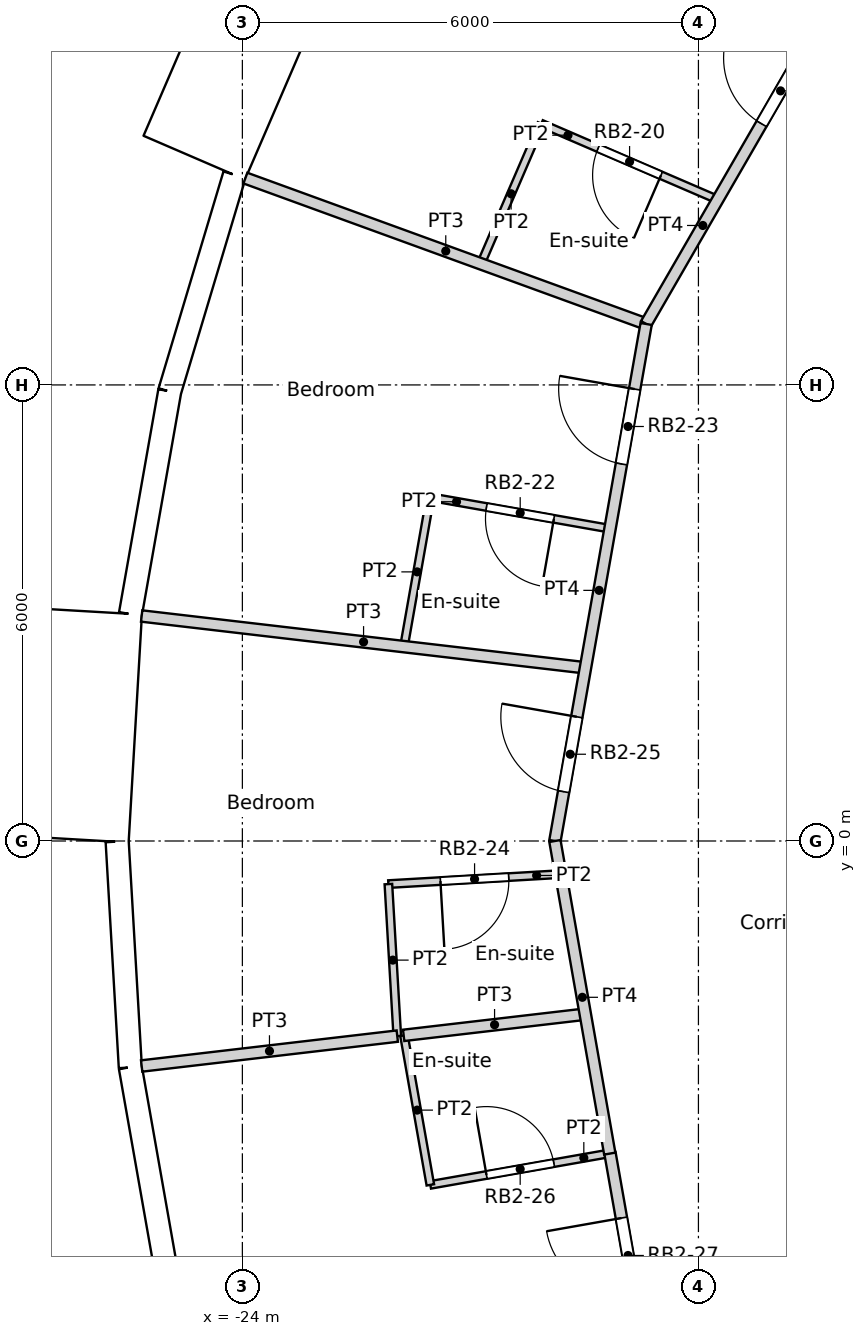
"""IFC4 building model, lengths in metres.
Left out: names, types, materials, properties, quantities, classifications, styles, units other than length and angle.
Written with IfcOpenShell. Run it as: python <this file> out.ifc"""

import sys

from ifc_helpers import new_model, si_unit, direction, frame, frame_2d, origin, origin_2d, place, context, subcontext, project, spatial, rectangle, circle, extrude, element, fill, save


model = new_model("IFC4")
c1 = context("Model", 3, precision=1e-05, world=origin(), true_north=direction((0.0, 1.0)))
c2 = subcontext(c1, "Body", "Model", "MODEL_VIEW")
j1 = project(units=[si_unit("LENGTHUNIT", "METRE"), si_unit("PLANEANGLEUNIT", "RADIAN")], contexts=[c1])
p1 = place(None, origin())
s1 = spatial("IfcSite", under=j1, at=p1, CompositionType="ELEMENT")
p2 = place(p1, origin())
s2 = spatial("IfcBuilding", under=s1, at=p2, CompositionType="ELEMENT")
p3 = place(p2, frame((0.0, 0.0, 136.8)))
s3 = spatial("IfcBuildingStorey", under=s2, at=p3, CompositionType="ELEMENT", Elevation=136.8)
for number, where, z_axis, x_axis in (
    (1, (-23.067, 8.396, 0.0), (0.0, 0.0, 1.0), (1.0, 0.0, 0.0)),
    (2, (-24.382, 2.85, 0.0), (0.0, 0.0, 1.0), (1.0, 0.0, 0.0)),
    (3, (-24.382, -2.85, 0.0), (0.0, 0.0, 1.0), (1.0, 0.0, 0.0)),
):
    element("IfcColumn", number, at=place(p3, frame(where, z_axis=z_axis, x_axis=x_axis)), inside=s3, PredefinedType="COLUMN", context=c2, shape_type="SweptSolid", body=[
        extrude(circle(Radius=0.6, at=origin_2d()), origin(), (0.0, 0.0, 1.0), 3.6),
    ])
for number, where, z_axis, x_axis in (
    (4, (-16.958, 8.167, 0.0), (0.0, 0.0, 1.0), (1.0, 0.0, 0.0)),
    (5, (-18.612, 2.805, 0.0), (0.0, 0.0, 1.0), (1.0, 0.0, 0.0)),
    (6, (-18.612, -2.805, 0.0), (0.0, 0.0, 1.0), (1.0, 0.0, 0.0)),
):
    element("IfcColumn", number, at=place(p3, frame(where, z_axis=z_axis, x_axis=x_axis)), inside=s3, PredefinedType="COLUMN", context=c2, shape_type="SweptSolid", body=[
        extrude(circle(Radius=0.65, at=origin_2d()), origin(), (0.0, 0.0, 1.0), 3.6),
    ])
p4 = place(p3, frame((-23.444, 11.746, -0.3), z_axis=(0.0, 0.0, 1.0), x_axis=(-0.396079003245, -0.918216435917, 0.0)))
e7 = element("IfcWall", 7, at=p4, inside=s3, PredefinedType="ELEMENTEDWALL", context=c2, shape_type="SweptSolid", body=[
    extrude(rectangle(XDim=3.0, YDim=1.45, at=frame_2d((1.5, 0.0))), origin(), (0.0, 0.0, 1.0), 3.6),
])
p5 = place(p4, frame((1.5, 0.0, 1.85)))
e8 = element("IfcOpeningElement", 8, at=p5, cuts=e7, PredefinedType="OPENING", context=c2, shape_type="SweptSolid", body=[
    extrude(circle(Radius=0.9, at=origin_2d()), frame((0.0, 0.735, 0.0), z_axis=(0.0, -1.0, 0.0), x_axis=(1.0, 0.0, 0.0)), (0.0, 0.0, 1.0), 1.47),
])
p6 = place(p3, frame((-24.104, 8.763, 0.0), z_axis=(0.0, 0.0, 1.0), x_axis=(-0.286782750849, -0.957995643944, 0.0)))
e9 = element("IfcWall", 9, at=p6, inside=s3, PredefinedType="SOLIDWALL", context=c2, shape_type="SweptSolid", body=[
    extrude(rectangle(XDim=2.973, YDim=0.3, at=frame_2d((1.486, 0.0))), origin(), (0.0, 0.0, 1.0), 2.8),
])
p7 = place(p6, frame((1.486, 0.0, 1.55)))
e10 = element("IfcOpeningElement", 10, at=p7, cuts=e9, PredefinedType="OPENING", context=c2, shape_type="SweptSolid", body=[
    extrude(circle(Radius=0.9, at=origin_2d()), frame((0.0, 0.16, 0.0), z_axis=(0.0, -1.0, 0.0), x_axis=(1.0, 0.0, 0.0)), (0.0, 0.0, 1.0), 0.32),
])
p8 = place(p3, frame((-24.956, 5.915, 0.0), z_axis=(0.0, 0.0, 1.0), x_axis=(-0.173686952598, -0.984800915159, 0.0)))
e11 = element("IfcWall", 11, at=p8, inside=s3, PredefinedType="SOLIDWALL", context=c2, shape_type="SweptSolid", body=[
    extrude(rectangle(XDim=2.973, YDim=0.3, at=frame_2d((1.486, 0.0))), origin(), (0.0, 0.0, 1.0), 3.3),
])
p9 = place(p8, frame((1.486, 0.0, 1.55)))
e12 = element("IfcOpeningElement", 12, at=p9, cuts=e11, PredefinedType="OPENING", context=c2, shape_type="SweptSolid", body=[
    extrude(circle(Radius=0.9, at=origin_2d()), frame((0.0, 0.16, 0.0), z_axis=(0.0, -1.0, 0.0), x_axis=(1.0, 0.0, 0.0)), (0.0, 0.0, 1.0), 0.32),
])
p10 = place(p3, frame((-26.048, 3.02, -0.3), z_axis=(0.0, 0.0, 1.0), x_axis=(-0.058106596105, -0.998310384344, 0.0)))
e13 = element("IfcWall", 13, at=p10, inside=s3, PredefinedType="ELEMENTEDWALL", context=c2, shape_type="SweptSolid", body=[
    extrude(rectangle(XDim=3.0, YDim=1.45, at=frame_2d((1.5, 0.0))), origin(), (0.0, 0.0, 1.0), 3.6),
])
p11 = place(p10, frame((1.5, 0.0, 1.85)))
e14 = element("IfcOpeningElement", 14, at=p11, cuts=e13, PredefinedType="OPENING", context=c2, shape_type="SweptSolid", body=[
    extrude(circle(Radius=0.9, at=origin_2d()), frame((0.0, 0.735, 0.0), z_axis=(0.0, -1.0, 0.0), x_axis=(1.0, 0.0, 0.0)), (0.0, 0.0, 1.0), 1.47),
])
p12 = place(p3, frame((-25.647, -0.01, 0.0), z_axis=(0.0, 0.0, 1.0), x_axis=(0.058139540521, -0.998308466271, 0.0)))
e15 = element("IfcWall", 15, at=p12, inside=s3, PredefinedType="SOLIDWALL", context=c2, shape_type="SweptSolid", body=[
    extrude(rectangle(XDim=2.973, YDim=0.3, at=frame_2d((1.487, 0.0))), origin(), (0.0, 0.0, 1.0), 2.8),
])
p13 = place(p12, frame((1.486, 0.0, 1.55)))
e16 = element("IfcOpeningElement", 16, at=p13, cuts=e15, PredefinedType="OPENING", context=c2, shape_type="SweptSolid", body=[
    extrude(circle(Radius=0.9, at=origin_2d()), frame((0.0, 0.16, 0.0), z_axis=(0.0, -1.0, 0.0), x_axis=(1.0, 0.0, 0.0)), (0.0, 0.0, 1.0), 0.32),
])
p14 = place(p3, frame((-25.474, -2.978, 0.0), z_axis=(0.0, 0.0, 1.0), x_axis=(0.173686952598, -0.984800915159, 0.0)))
e17 = element("IfcWall", 17, at=p14, inside=s3, PredefinedType="SOLIDWALL", context=c2, shape_type="SweptSolid", body=[
    extrude(rectangle(XDim=2.973, YDim=0.3, at=frame_2d((1.486, 0.0))), origin(), (0.0, 0.0, 1.0), 3.3),
])
p15 = place(p14, frame((1.486, 0.0, 1.55)))
e18 = element("IfcOpeningElement", 18, at=p15, cuts=e17, PredefinedType="OPENING", context=c2, shape_type="SweptSolid", body=[
    extrude(circle(Radius=0.9, at=origin_2d()), frame((0.0, 0.16, 0.0), z_axis=(0.0, -1.0, 0.0), x_axis=(1.0, 0.0, 0.0)), (0.0, 0.0, 1.0), 0.32),
])
p16 = place(p3, frame((-18.69, 6.803, 0.0), z_axis=(0.0, 0.0, 1.0), x_axis=(0.500229307554, 0.865892972523, 0.0)))
e19 = element("IfcWall", 19, at=p16, inside=s3, PredefinedType="PARTITIONING", context=c2, shape_type="SweptSolid", body=[
    extrude(rectangle(XDim=6.907, YDim=0.15, at=frame_2d((3.454, 0.0))), origin(), (0.0, 0.0, 1.0), 3.3),
])
p17 = place(p16, frame((3.04, 0.0, 0.0)))
e20 = element("IfcOpeningElement", 20, at=p17, cuts=e19, PredefinedType="OPENING", context=c2, shape_type="SweptSolid", body=[
    extrude(rectangle(XDim=1.0, YDim=2.1, at=frame_2d((0.5, 1.05))), frame((0.0, 0.075, 0.0), z_axis=(0.0, -1.0, 0.0), x_axis=(1.0, 0.0, 0.0)), (0.0, 0.0, 1.0), 0.15),
])
p18 = place(p3, frame((-19.888, 0.0, 0.0), z_axis=(0.0, 0.0, 1.0), x_axis=(0.173763153374, 0.984787472772, 0.0)))
e21 = element("IfcWall", 21, at=p18, inside=s3, PredefinedType="PARTITIONING", context=c2, shape_type="SweptSolid", body=[
    extrude(rectangle(XDim=6.907, YDim=0.15, at=frame_2d((3.454, 0.0))), origin(), (0.0, 0.0, 1.0), 3.3),
])
p19 = place(p18, frame((5.037, 0.0, 0.0)))
e22 = element("IfcOpeningElement", 22, at=p19, cuts=e21, PredefinedType="OPENING", context=c2, shape_type="SweptSolid", body=[
    extrude(rectangle(XDim=1.0, YDim=2.1, at=frame_2d((0.5, 1.05))), frame((0.0, 0.075, 0.0), z_axis=(0.0, -1.0, 0.0), x_axis=(1.0, 0.0, 0.0)), (0.0, 0.0, 1.0), 0.15),
])
p20 = place(p18, frame((0.659, 0.0, 0.0)))
e23 = element("IfcOpeningElement", 23, at=p20, cuts=e21, PredefinedType="OPENING", context=c2, shape_type="SweptSolid", body=[
    extrude(rectangle(XDim=1.0, YDim=2.1, at=frame_2d((0.5, 1.05))), frame((0.0, 0.075, 0.0), z_axis=(0.0, -1.0, 0.0), x_axis=(1.0, 0.0, 0.0)), (0.0, 0.0, 1.0), 0.15),
])
p21 = place(p3, frame((-19.888, 0.0, 0.0), z_axis=(0.0, 0.0, 1.0), x_axis=(0.1727845501, -0.984959643461, 0.0)))
e24 = element("IfcWall", 24, at=p21, inside=s3, PredefinedType="PARTITIONING", context=c2, shape_type="SweptSolid", body=[
    extrude(rectangle(XDim=4.175, YDim=0.15, at=frame_2d((2.088, 0.0))), origin(), (0.0, 0.0, 1.0), 3.3),
])
p22 = place(p3, frame((-19.164, -4.104, 0.0), z_axis=(0.0, 0.0, 1.0), x_axis=(0.173770083029, -0.984786250028, 0.0)))
e25 = element("IfcWall", 25, at=p22, inside=s3, PredefinedType="PARTITIONING", context=c2, shape_type="SweptSolid", body=[
    extrude(rectangle(XDim=2.74, YDim=0.15, at=frame_2d((1.37, 0.0))), origin(), (0.0, 0.0, 1.0), 3.3),
])
p23 = place(p22, frame((0.87, 0.0, 0.0)))
e26 = element("IfcOpeningElement", 26, at=p23, cuts=e25, PredefinedType="OPENING", context=c2, shape_type="SweptSolid", body=[
    extrude(rectangle(XDim=1.0, YDim=2.1, at=frame_2d((0.5, 1.05))), frame((0.0, 0.075, 0.0), z_axis=(0.0, -1.0, 0.0), x_axis=(1.0, 0.0, 0.0)), (0.0, 0.0, 1.0), 0.15),
])
p24 = place(p3, frame((-20.067, 9.437, 0.0), z_axis=(0.0, 0.0, 1.0), x_axis=(0.918293825202, -0.395899546091, 0.0)))
e27 = element("IfcWall", 27, at=p24, inside=s3, PredefinedType="PARTITIONING", context=c2, shape_type="SweptSolid", body=[
    extrude(rectangle(XDim=2.528, YDim=0.1, at=frame_2d((1.264, 0.0))), origin(), (0.0, 0.0, 1.0), 3.3),
])
p25 = place(p24, frame((0.815, 0.0, 0.0)))
e28 = element("IfcOpeningElement", 28, at=p25, cuts=e27, PredefinedType="OPENING", context=c2, shape_type="SweptSolid", body=[
    extrude(rectangle(XDim=0.9, YDim=2.04, at=frame_2d((0.45, 1.02))), frame((0.0, 0.05, 0.0), z_axis=(0.0, -1.0, 0.0), x_axis=(1.0, 0.0, 0.0)), (0.0, 0.0, 1.0), 0.1),
])
p26 = place(p3, frame((-20.862, 7.593, 0.0), z_axis=(0.0, 0.0, 1.0), x_axis=(0.395972527348, 0.918262357709, 0.0)))
e29 = element("IfcWall", 29, at=p26, inside=s3, PredefinedType="PARTITIONING", context=c2, shape_type="SweptSolid", body=[
    extrude(rectangle(XDim=2.008, YDim=0.1, at=frame_2d((1.004, 0.0))), origin(), (0.0, 0.0, 1.0), 3.3),
])
p27 = place(p3, frame((-23.96, 8.721, 0.0), z_axis=(0.0, 0.0, 1.0), x_axis=(0.939653583607, -0.342127378054, 0.0)))
e30 = element("IfcWall", 30, at=p27, inside=s3, PredefinedType="PARTITIONING", context=c2, shape_type="SweptSolid", body=[
    extrude(rectangle(XDim=5.61, YDim=0.15, at=frame_2d((2.805, 0.0))), origin(), (0.0, 0.0, 1.0), 3.3),
])
p28 = place(p3, frame((-21.527, 4.524, 0.0), z_axis=(0.0, 0.0, 1.0), x_axis=(0.9848663854, -0.173315327969, 0.0)))
e31 = element("IfcWall", 31, at=p28, inside=s3, PredefinedType="PARTITIONING", context=c2, shape_type="SweptSolid", body=[
    extrude(rectangle(XDim=2.4, YDim=0.1, at=frame_2d((1.2, 0.0))), origin(), (0.0, 0.0, 1.0), 3.3),
])
p29 = place(p28, frame((0.75, 0.0, 0.0)))
e32 = element("IfcOpeningElement", 32, at=p29, cuts=e31, PredefinedType="OPENING", context=c2, shape_type="SweptSolid", body=[
    extrude(rectangle(XDim=0.9, YDim=2.04, at=frame_2d((0.45, 1.02))), frame((0.0, 0.05, 0.0), z_axis=(0.0, -1.0, 0.0), x_axis=(1.0, 0.0, 0.0)), (0.0, 0.0, 1.0), 0.1),
])
p30 = place(p3, frame((-21.874, 2.557, 0.0), z_axis=(0.0, 0.0, 1.0), x_axis=(0.17368771375, 0.984800780916, 0.0)))
e33 = element("IfcWall", 33, at=p30, inside=s3, PredefinedType="PARTITIONING", context=c2, shape_type="SweptSolid", body=[
    extrude(rectangle(XDim=1.997, YDim=0.1, at=frame_2d((0.999, 0.0))), origin(), (0.0, 0.0, 1.0), 3.3),
])
p31 = place(p3, frame((-25.325, 2.96, 0.0), z_axis=(0.0, 0.0, 1.0), x_axis=(0.993249747924, -0.115995423397, 0.0)))
e34 = element("IfcWall", 34, at=p31, inside=s3, PredefinedType="PARTITIONING", context=c2, shape_type="SweptSolid", body=[
    extrude(rectangle(XDim=5.879, YDim=0.15, at=frame_2d((2.939, 0.0))), origin(), (0.0, 0.0, 1.0), 3.3),
])
p32 = place(p3, frame((-22.079, -0.567, 0.0), z_axis=(0.0, 0.0, 1.0), x_axis=(0.998314893836, 0.058029068102, 0.0)))
e35 = element("IfcWall", 35, at=p32, inside=s3, PredefinedType="PARTITIONING", context=c2, shape_type="SweptSolid", body=[
    extrude(rectangle(XDim=2.272, YDim=0.1, at=frame_2d((1.136, 0.0))), origin(), (0.0, 0.0, 1.0), 3.3),
])
p33 = place(p32, frame((0.686, 0.0, 0.0)))
e36 = element("IfcOpeningElement", 36, at=p33, cuts=e35, PredefinedType="OPENING", context=c2, shape_type="SweptSolid", body=[
    extrude(rectangle(XDim=0.9, YDim=2.04, at=frame_2d((0.45, 1.02))), frame((0.0, 0.05, 0.0), z_axis=(0.0, -1.0, 0.0), x_axis=(1.0, 0.0, 0.0)), (0.0, 0.0, 1.0), 0.1),
])
p34 = place(p3, frame((-22.079, -0.567, 0.0), z_axis=(0.0, 0.0, 1.0), x_axis=(0.058493425416, -0.998287793766, 0.0)))
e37 = element("IfcWall", 37, at=p34, inside=s3, PredefinedType="PARTITIONING", context=c2, shape_type="SweptSolid", body=[
    extrude(rectangle(XDim=2.003, YDim=0.1, at=frame_2d((1.002, 0.0))), origin(), (0.0, 0.0, 1.0), 3.3),
])
p35 = place(p3, frame((-25.325, -2.96, 0.0), z_axis=(0.0, 0.0, 1.0), x_axis=(0.993238911344, 0.11608817766, 0.0)))
e38 = element("IfcWall", 38, at=p35, inside=s3, PredefinedType="PARTITIONING", context=c2, shape_type="SweptSolid", body=[
    extrude(rectangle(XDim=3.386, YDim=0.15, at=frame_2d((1.693, 0.0))), origin(), (0.0, 0.0, 1.0), 3.3),
])
p36 = place(p3, frame((-21.878, -2.557, 0.0), z_axis=(0.0, 0.0, 1.0), x_axis=(0.99327460921, 0.115782341913, 0.0)))
e39 = element("IfcWall", 39, at=p36, inside=s3, PredefinedType="PARTITIONING", context=c2, shape_type="SweptSolid", body=[
    extrude(rectangle(XDim=2.408, YDim=0.15, at=frame_2d((1.204, 0.0))), origin(), (0.0, 0.0, 1.0), 3.3),
])
p37 = place(p3, frame((-21.874, -2.557, 0.0), z_axis=(0.0, 0.0, 1.0), x_axis=(0.17368771375, -0.984800780916, 0.0)))
e40 = element("IfcWall", 40, at=p37, inside=s3, PredefinedType="PARTITIONING", context=c2, shape_type="SweptSolid", body=[
    extrude(rectangle(XDim=1.997, YDim=0.1, at=frame_2d((0.999, 0.0))), origin(), (0.0, 0.0, 1.0), 3.3),
])
p38 = place(p3, frame((-21.527, -4.524, 0.0), z_axis=(0.0, 0.0, 1.0), x_axis=(0.9848663854, 0.173315327969, 0.0)))
e41 = element("IfcWall", 41, at=p38, inside=s3, PredefinedType="PARTITIONING", context=c2, shape_type="SweptSolid", body=[
    extrude(rectangle(XDim=2.4, YDim=0.1, at=frame_2d((1.2, 0.0))), origin(), (0.0, 0.0, 1.0), 3.3),
])
p39 = place(p38, frame((0.75, 0.0, 0.0)))
e42 = element("IfcOpeningElement", 42, at=p39, cuts=e41, PredefinedType="OPENING", context=c2, shape_type="SweptSolid", body=[
    extrude(rectangle(XDim=0.9, YDim=2.04, at=frame_2d((0.45, 1.02))), frame((0.0, 0.05, 0.0), z_axis=(0.0, -1.0, 0.0), x_axis=(1.0, 0.0, 0.0)), (0.0, 0.0, 1.0), 0.1),
])
p40 = place(p5, origin())
e43 = element("IfcWindow", 43, at=p40, inside=s3, PartitioningType="SINGLE_PANEL", PredefinedType="WINDOW", context=c2, shape_type="SweptSolid", body=[
    extrude(circle(Radius=0.9, at=origin_2d()), frame((0.0, 0.695, 0.0), z_axis=(0.0, -1.0, 0.0), x_axis=(1.0, 0.0, 0.0)), (0.0, 0.0, 1.0), 0.1),
])
fill(e8, e43)
p41 = place(p7, origin())
e44 = element("IfcWindow", 44, at=p41, inside=s3, PartitioningType="SINGLE_PANEL", PredefinedType="WINDOW", context=c2, shape_type="SweptSolid", body=[
    extrude(circle(Radius=0.9, at=origin_2d()), frame((0.0, 0.12, 0.0), z_axis=(0.0, -1.0, 0.0), x_axis=(1.0, 0.0, 0.0)), (0.0, 0.0, 1.0), 0.1),
])
fill(e10, e44)
p42 = place(p9, origin())
e45 = element("IfcWindow", 45, at=p42, inside=s3, PartitioningType="SINGLE_PANEL", PredefinedType="WINDOW", context=c2, shape_type="SweptSolid", body=[
    extrude(circle(Radius=0.9, at=origin_2d()), frame((0.0, 0.12, 0.0), z_axis=(0.0, -1.0, 0.0), x_axis=(1.0, 0.0, 0.0)), (0.0, 0.0, 1.0), 0.1),
])
fill(e12, e45)
p43 = place(p11, origin())
e46 = element("IfcWindow", 46, at=p43, inside=s3, PartitioningType="SINGLE_PANEL", PredefinedType="WINDOW", context=c2, shape_type="SweptSolid", body=[
    extrude(circle(Radius=0.9, at=origin_2d()), frame((0.0, 0.695, 0.0), z_axis=(0.0, -1.0, 0.0), x_axis=(1.0, 0.0, 0.0)), (0.0, 0.0, 1.0), 0.1),
])
fill(e14, e46)
p44 = place(p13, origin())
e47 = element("IfcWindow", 47, at=p44, inside=s3, PartitioningType="SINGLE_PANEL", PredefinedType="WINDOW", context=c2, shape_type="SweptSolid", body=[
    extrude(circle(Radius=0.9, at=origin_2d()), frame((0.0, 0.12, 0.0), z_axis=(0.0, -1.0, 0.0), x_axis=(1.0, 0.0, 0.0)), (0.0, 0.0, 1.0), 0.1),
])
fill(e16, e47)
p45 = place(p15, origin())
e48 = element("IfcWindow", 48, at=p45, inside=s3, PartitioningType="SINGLE_PANEL", PredefinedType="WINDOW", context=c2, shape_type="SweptSolid", body=[
    extrude(circle(Radius=0.9, at=origin_2d()), frame((0.0, 0.12, 0.0), z_axis=(0.0, -1.0, 0.0), x_axis=(1.0, 0.0, 0.0)), (0.0, 0.0, 1.0), 0.1),
])
fill(e18, e48)
p46 = place(p25, origin())
e49 = element("IfcDoor", 49, at=p46, inside=s3, OperationType="SINGLE_SWING_LEFT", PredefinedType="DOOR", context=c2, shape_type="SweptSolid", body=[
    extrude(rectangle(XDim=0.9, YDim=2.04, at=frame_2d((0.45, 1.02))), frame((0.0, 0.025, 0.0), z_axis=(0.0, -1.0, 0.0), x_axis=(1.0, 0.0, 0.0)), (0.0, 0.0, 1.0), 0.05),
])
fill(e28, e49)
p47 = place(p17, origin())
e50 = element("IfcDoor", 50, at=p47, inside=s3, OperationType="SINGLE_SWING_RIGHT", PredefinedType="DOOR", context=c2, shape_type="SweptSolid", body=[
    extrude(rectangle(XDim=1.0, YDim=2.1, at=frame_2d((0.5, 1.05))), frame((0.0, 0.025, 0.0), z_axis=(0.0, -1.0, 0.0), x_axis=(1.0, 0.0, 0.0)), (0.0, 0.0, 1.0), 0.05),
])
fill(e20, e50)
p48 = place(p29, origin())
e51 = element("IfcDoor", 51, at=p48, inside=s3, OperationType="SINGLE_SWING_LEFT", PredefinedType="DOOR", context=c2, shape_type="SweptSolid", body=[
    extrude(rectangle(XDim=0.9, YDim=2.04, at=frame_2d((0.45, 1.02))), frame((0.0, 0.025, 0.0), z_axis=(0.0, -1.0, 0.0), x_axis=(1.0, 0.0, 0.0)), (0.0, 0.0, 1.0), 0.05),
])
fill(e32, e51)
p49 = place(p19, origin())
e52 = element("IfcDoor", 52, at=p49, inside=s3, OperationType="SINGLE_SWING_RIGHT", PredefinedType="DOOR", context=c2, shape_type="SweptSolid", body=[
    extrude(rectangle(XDim=1.0, YDim=2.1, at=frame_2d((0.5, 1.05))), frame((0.0, 0.025, 0.0), z_axis=(0.0, -1.0, 0.0), x_axis=(1.0, 0.0, 0.0)), (0.0, 0.0, 1.0), 0.05),
])
fill(e22, e52)
p50 = place(p33, origin())
e53 = element("IfcDoor", 53, at=p50, inside=s3, OperationType="SINGLE_SWING_RIGHT", PredefinedType="DOOR", context=c2, shape_type="SweptSolid", body=[
    extrude(rectangle(XDim=0.9, YDim=2.04, at=frame_2d((0.45, 1.02))), frame((0.0, 0.025, 0.0), z_axis=(0.0, -1.0, 0.0), x_axis=(1.0, 0.0, 0.0)), (0.0, 0.0, 1.0), 0.05),
])
fill(e36, e53)
p51 = place(p20, origin())
e54 = element("IfcDoor", 54, at=p51, inside=s3, OperationType="SINGLE_SWING_RIGHT", PredefinedType="DOOR", context=c2, shape_type="SweptSolid", body=[
    extrude(rectangle(XDim=1.0, YDim=2.1, at=frame_2d((0.5, 1.05))), frame((0.0, 0.025, 0.0), z_axis=(0.0, -1.0, 0.0), x_axis=(1.0, 0.0, 0.0)), (0.0, 0.0, 1.0), 0.05),
])
fill(e23, e54)
p52 = place(p39, origin())
e55 = element("IfcDoor", 55, at=p52, inside=s3, OperationType="SINGLE_SWING_LEFT", PredefinedType="DOOR", context=c2, shape_type="SweptSolid", body=[
    extrude(rectangle(XDim=0.9, YDim=2.04, at=frame_2d((0.45, 1.02))), frame((0.0, 0.025, 0.0), z_axis=(0.0, -1.0, 0.0), x_axis=(1.0, 0.0, 0.0)), (0.0, 0.0, 1.0), 0.05),
])
fill(e42, e55)
p53 = place(p23, origin())
e56 = element("IfcDoor", 56, at=p53, inside=s3, OperationType="SINGLE_SWING_RIGHT", PredefinedType="DOOR", context=c2, shape_type="SweptSolid", body=[
    extrude(rectangle(XDim=1.0, YDim=2.1, at=frame_2d((0.5, 1.05))), frame((0.0, 0.025, 0.0), z_axis=(0.0, -1.0, 0.0), x_axis=(1.0, 0.0, 0.0)), (0.0, 0.0, 1.0), 0.05),
])
fill(e26, e56)
save(model, sys.argv[1])
